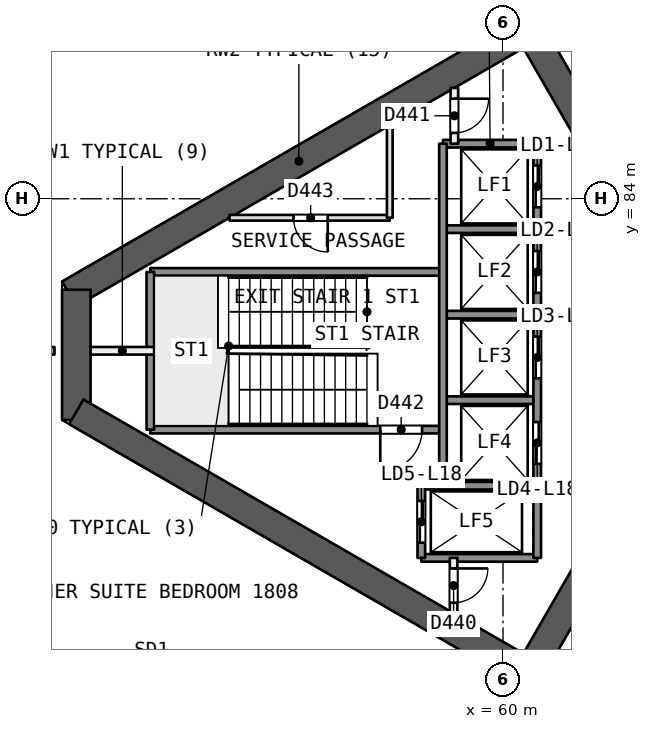
"""IFC4 building model, lengths in metres.
Left out: names, types, materials, properties, quantities, classifications, styles, units other than length and angle.
Written with IfcOpenShell. Run it as: python <this file> out.ifc"""

import sys

from ifc_helpers import new_model, si_unit, direction, frame, frame_2d, origin, place, context, subcontext, project, spatial, rectangle, extrude, element, fill, save


model = new_model("IFC4")
c1 = context("Model", 3, precision=1e-05, world=origin(), true_north=direction((0.0, 1.0)))
c2 = subcontext(c1, "Body", "Model", "MODEL_VIEW")
j1 = project(units=[si_unit("LENGTHUNIT", "METRE"), si_unit("PLANEANGLEUNIT", "RADIAN")], contexts=[c1])
p1 = place(None, origin())
s1 = spatial("IfcSite", under=j1, at=p1, CompositionType="ELEMENT")
p2 = place(p1, origin())
s2 = spatial("IfcBuilding", under=s1, at=p2, CompositionType="ELEMENT")
p3 = place(p2, frame((0.0, 0.0, 79.5)))
s3 = spatial("IfcBuildingStorey", under=s2, at=p3, CompositionType="ELEMENT", Elevation=79.5)
p4 = place(p3, frame((65.567, 80.0, 0.0), z_axis=(0.0, 0.0, 1.0), x_axis=(-0.499988615364, 0.866031976607, 0.0)))
e1 = element("IfcWall", 1, at=p4, inside=s3, PredefinedType="SHEAR", context=c2, shape_type="SweptSolid", body=[
    extrude(rectangle(XDim=10.163, YDim=0.75, at=frame_2d((5.082, 0.0))), origin(), (0.0, 0.0, 1.0), 3.7),
])
p5 = place(p4, frame((0.733, 0.0, 0.0)))
e2 = element("IfcOpeningElement", 2, at=p5, cuts=e1, PredefinedType="OPENING", context=c2, shape_type="SweptSolid", body=[
    extrude(rectangle(XDim=1.2, YDim=2.1, at=frame_2d((0.6, 1.05))), frame((0.0, 0.385, 0.0), z_axis=(0.0, -1.0, 0.0), x_axis=(1.0, 0.0, 0.0)), (0.0, 0.0, 1.0), 0.771),
])
p6 = place(p3, frame((60.673, 88.477, 0.0), z_axis=(0.0, 0.0, 1.0), x_axis=(-0.8660248072, -0.500001033313, 0.0)))
e3 = element("IfcWall", 3, at=p6, inside=s3, PredefinedType="SHEAR", context=c2, shape_type="SweptSolid", body=[
    extrude(rectangle(XDim=13.958, YDim=0.75, at=frame_2d((6.979, 0.0))), origin(), (0.0, 0.0, 1.0), 3.7),
])
p7 = place(p3, frame((48.772, 81.606, 0.0), z_axis=(0.0, 0.0, 1.0), x_axis=(0.0, -1.0, 0.0)))
e4 = element("IfcWall", 4, at=p7, inside=s3, PredefinedType="SHEAR", context=c2, shape_type="SweptSolid", body=[
    extrude(rectangle(XDim=3.429, YDim=0.75, at=frame_2d((1.714, 0.0))), origin(), (0.0, 0.0, 1.0), 3.7),
])
p8 = place(p3, frame((48.772, 78.394, 0.0), z_axis=(0.0, 0.0, 1.0), x_axis=(0.866028339916, -0.499994914436, 0.0)))
e5 = element("IfcWall", 5, at=p8, inside=s3, PredefinedType="SHEAR", context=c2, shape_type="SweptSolid", body=[
    extrude(rectangle(XDim=14.117, YDim=0.75, at=frame_2d((7.059, 0.0))), origin(), (0.0, 0.0, 1.0), 3.7),
])
p9 = place(p3, frame((60.673, 71.523, 0.0), z_axis=(0.0, 0.0, 1.0), x_axis=(0.499997052475, 0.866027105532, 0.0)))
e6 = element("IfcWall", 6, at=p9, inside=s3, PredefinedType="SHEAR", context=c2, shape_type="SweptSolid", body=[
    extrude(rectangle(XDim=10.005, YDim=0.75, at=frame_2d((5.002, 0.0))), origin(), (0.0, 0.0, 1.0), 3.7),
])
p10 = place(p9, frame((7.855, 0.0, 0.0)))
e7 = element("IfcOpeningElement", 7, at=p10, cuts=e6, PredefinedType="OPENING", context=c2, shape_type="SweptSolid", body=[
    extrude(rectangle(XDim=1.2, YDim=2.1, at=frame_2d((0.6, 1.05))), frame((0.0, 0.385, 0.0), z_axis=(0.0, -1.0, 0.0), x_axis=(1.0, 0.0, 0.0)), (0.0, 0.0, 1.0), 0.771),
])
p11 = place(p3, frame((39.372, 80.0, 0.0), z_axis=(0.0, 0.0, 1.0), x_axis=(1.0, 0.0, 0.0)))
e8 = element("IfcWall", 8, at=p11, inside=s3, PredefinedType="PARTITIONING", context=c2, shape_type="SweptSolid", body=[
    extrude(rectangle(XDim=8.826, YDim=0.2, at=frame_2d((4.413, 0.0))), origin(), (0.0, 0.0, 1.0), 3.2),
])
p12 = place(p3, frame((39.223, 83.016, 0.0), z_axis=(0.0, 0.0, 1.0), x_axis=(0.86602468924, 0.500001237625, 0.0)))
e9 = element("IfcWall", 9, at=p12, inside=s3, PredefinedType="SOLIDWALL", context=c2, shape_type="SweptSolid", body=[
    extrude(rectangle(XDim=58.951, YDim=0.3, at=frame_2d((29.476, 0.0))), origin(), (0.0, 0.0, 1.0), 3.2),
])
p13 = place(p12, frame((28.743, 0.0, 0.0)))
e10 = element("IfcOpeningElement", 10, at=p13, cuts=e9, PredefinedType="OPENING", context=c2, shape_type="SweptSolid", body=[
    extrude(rectangle(XDim=2.4, YDim=2.4, at=frame_2d((1.2, 1.2))), frame((0.0, 0.161, 0.0), z_axis=(0.0, -1.0, 0.0), x_axis=(1.0, 0.0, 0.0)), (0.0, 0.0, 1.0), 0.321),
])
p14 = place(p12, frame((34.043, 0.0, 0.0)))
e11 = element("IfcOpeningElement", 11, at=p14, cuts=e9, PredefinedType="OPENING", context=c2, shape_type="SweptSolid", body=[
    extrude(rectangle(XDim=2.4, YDim=2.4, at=frame_2d((1.2, 1.2))), frame((0.0, 0.161, 0.0), z_axis=(0.0, -1.0, 0.0), x_axis=(1.0, 0.0, 0.0)), (0.0, 0.0, 1.0), 0.321),
])
p15 = place(p12, frame((45.739, 0.0, 0.0)))
e12 = element("IfcOpeningElement", 12, at=p15, cuts=e9, PredefinedType="OPENING", context=c2, shape_type="SweptSolid", body=[
    extrude(rectangle(XDim=2.4, YDim=2.4, at=frame_2d((1.2, 1.2))), frame((0.0, 0.161, 0.0), z_axis=(0.0, -1.0, 0.0), x_axis=(1.0, 0.0, 0.0)), (0.0, 0.0, 1.0), 0.321),
])
p16 = place(p12, frame((22.976, 0.0, 0.0)))
e13 = element("IfcOpeningElement", 13, at=p16, cuts=e9, PredefinedType="OPENING", context=c2, shape_type="SweptSolid", body=[
    extrude(rectangle(XDim=2.4, YDim=2.4, at=frame_2d((1.2, 1.2))), frame((0.0, 0.161, 0.0), z_axis=(0.0, -1.0, 0.0), x_axis=(1.0, 0.0, 0.0)), (0.0, 0.0, 1.0), 0.321),
])
p17 = place(p12, frame((10.773, 0.0, 0.0)))
e14 = element("IfcOpeningElement", 14, at=p17, cuts=e9, PredefinedType="OPENING", context=c2, shape_type="SweptSolid", body=[
    extrude(rectangle(XDim=2.4, YDim=2.4, at=frame_2d((1.2, 1.2))), frame((0.0, 0.161, 0.0), z_axis=(0.0, -1.0, 0.0), x_axis=(1.0, 0.0, 0.0)), (0.0, 0.0, 1.0), 0.321),
])
p18 = place(p3, frame((90.276, 47.508, 0.0), z_axis=(0.0, 0.0, 1.0), x_axis=(-0.86602468924, 0.500001237625, 0.0)))
e15 = element("IfcWall", 15, at=p18, inside=s3, PredefinedType="SOLIDWALL", context=c2, shape_type="SweptSolid", body=[
    extrude(rectangle(XDim=58.951, YDim=0.3, at=frame_2d((29.476, 0.0))), origin(), (0.0, 0.0, 1.0), 3.2),
])
p19 = place(p18, frame((32.173, 0.0, 0.0)))
e16 = element("IfcOpeningElement", 16, at=p19, cuts=e15, PredefinedType="OPENING", context=c2, shape_type="SweptSolid", body=[
    extrude(rectangle(XDim=2.4, YDim=2.4, at=frame_2d((1.2, 1.2))), frame((0.0, 0.161, 0.0), z_axis=(0.0, -1.0, 0.0), x_axis=(1.0, 0.0, 0.0)), (0.0, 0.0, 1.0), 0.321),
])
p20 = place(p18, frame((45.739, 0.0, 0.0)))
e17 = element("IfcOpeningElement", 17, at=p20, cuts=e15, PredefinedType="OPENING", context=c2, shape_type="SweptSolid", body=[
    extrude(rectangle(XDim=2.4, YDim=2.4, at=frame_2d((1.2, 1.2))), frame((0.0, 0.161, 0.0), z_axis=(0.0, -1.0, 0.0), x_axis=(1.0, 0.0, 0.0)), (0.0, 0.0, 1.0), 0.321),
])
p21 = place(p18, frame((13.495, 0.0, 0.0)))
e18 = element("IfcOpeningElement", 18, at=p21, cuts=e15, PredefinedType="OPENING", context=c2, shape_type="SweptSolid", body=[
    extrude(rectangle(XDim=2.4, YDim=2.4, at=frame_2d((1.2, 1.2))), frame((0.0, 0.161, 0.0), z_axis=(0.0, -1.0, 0.0), x_axis=(1.0, 0.0, 0.0)), (0.0, 0.0, 1.0), 0.321),
])
p22 = place(p3, frame((60.9, 85.45, 0.0), z_axis=(0.0, 0.0, 1.0), x_axis=(-1.0, 0.0, 0.0)))
e19 = element("IfcWall", 19, at=p22, inside=s3, PredefinedType="SOLIDWALL", context=c2, shape_type="SweptSolid", body=[
    extrude(rectangle(XDim=2.48, YDim=0.2, at=frame_2d((1.24, 0.0))), origin(), (0.0, 0.0, 1.0), 3.2),
])
p23 = place(p3, frame((57.02, 83.5, 0.0), z_axis=(0.0, 0.0, 1.0), x_axis=(-1.0, 0.0, 0.0)))
e20 = element("IfcWall", 20, at=p23, inside=s3, PredefinedType="PARTITIONING", context=c2, shape_type="SweptSolid", body=[
    extrude(rectangle(XDim=4.218, YDim=0.15, at=frame_2d((2.109, 0.0))), origin(), (0.0, 0.0, 1.0), 3.2),
])
p24 = place(p23, frame((1.631, 0.0, 0.0)))
e21 = element("IfcOpeningElement", 21, at=p24, cuts=e20, PredefinedType="OPENING", context=c2, shape_type="SweptSolid", body=[
    extrude(rectangle(XDim=0.9, YDim=2.1, at=frame_2d((0.45, 1.05))), frame((0.0, 0.085, 0.0), z_axis=(0.0, -1.0, 0.0), x_axis=(1.0, 0.0, 0.0)), (0.0, 0.0, 1.0), 0.171),
])
p25 = place(p3, frame((60.9, 83.2, 0.0), z_axis=(0.0, 0.0, 1.0), x_axis=(-1.0, 0.0, 0.0)))
e22 = element("IfcWall", 22, at=p25, inside=s3, PredefinedType="SOLIDWALL", context=c2, shape_type="SweptSolid", body=[
    extrude(rectangle(XDim=2.48, YDim=0.2, at=frame_2d((1.24, 0.0))), origin(), (0.0, 0.0, 1.0), 3.2),
])
p26 = place(p3, frame((58.42, 82.075, 0.0), z_axis=(0.0, 0.0, 1.0), x_axis=(-1.0, 0.0, 0.0)))
e23 = element("IfcWall", 23, at=p26, inside=s3, PredefinedType="SOLIDWALL", context=c2, shape_type="SweptSolid", body=[
    extrude(rectangle(XDim=7.7, YDim=0.2, at=frame_2d((3.85, 0.0))), origin(), (0.0, 0.0, 1.0), 3.2),
])
p27 = place(p3, frame((60.9, 80.95, 0.0), z_axis=(0.0, 0.0, 1.0), x_axis=(-1.0, 0.0, 0.0)))
e24 = element("IfcWall", 24, at=p27, inside=s3, PredefinedType="SOLIDWALL", context=c2, shape_type="SweptSolid", body=[
    extrude(rectangle(XDim=2.48, YDim=0.2, at=frame_2d((1.24, 0.0))), origin(), (0.0, 0.0, 1.0), 3.2),
])
p28 = place(p3, frame((50.82, 80.0, 0.0), z_axis=(0.0, 0.0, 1.0), x_axis=(-1.0, 0.0, 0.0)))
e25 = element("IfcWall", 25, at=p28, inside=s3, PredefinedType="PARTITIONING", context=c2, shape_type="SweptSolid", body=[
    extrude(rectangle(XDim=1.673, YDim=0.2, at=frame_2d((0.836, 0.0))), origin(), (0.0, 0.0, 1.0), 3.2),
])
p29 = place(p3, frame((60.9, 78.7, 0.0), z_axis=(0.0, 0.0, 1.0), x_axis=(-1.0, 0.0, 0.0)))
e26 = element("IfcWall", 26, at=p29, inside=s3, PredefinedType="SOLIDWALL", context=c2, shape_type="SweptSolid", body=[
    extrude(rectangle(XDim=2.48, YDim=0.2, at=frame_2d((1.24, 0.0))), origin(), (0.0, 0.0, 1.0), 3.2),
])
p30 = place(p3, frame((58.42, 77.925, 0.0), z_axis=(0.0, 0.0, 1.0), x_axis=(-1.0, 0.0, 0.0)))
e27 = element("IfcWall", 27, at=p30, inside=s3, PredefinedType="SOLIDWALL", context=c2, shape_type="SweptSolid", body=[
    extrude(rectangle(XDim=7.7, YDim=0.2, at=frame_2d((3.85, 0.0))), origin(), (0.0, 0.0, 1.0), 3.2),
])
p31 = place(p30, frame((0.55, 0.0, 0.0)))
e28 = element("IfcOpeningElement", 28, at=p31, cuts=e27, PredefinedType="OPENING", context=c2, shape_type="SweptSolid", body=[
    extrude(rectangle(XDim=1.1, YDim=2.1, at=frame_2d((0.55, 1.05))), frame((0.0, 0.11, 0.0), z_axis=(0.0, -1.0, 0.0), x_axis=(1.0, 0.0, 0.0)), (0.0, 0.0, 1.0), 0.221),
])
for number, where, z_axis, x_axis in (
    (29, (60.9, 76.45, 0.0), (0.0, 0.0, 1.0), (-1.0, 0.0, 0.0)),
    (30, (60.9, 74.55, 0.0), (0.0, 0.0, 1.0), (-1.0, 0.0, 0.0)),
):
    element("IfcWall", number, at=place(p3, frame(where, z_axis=z_axis, x_axis=x_axis)), inside=s3, PredefinedType="SOLIDWALL", context=c2, shape_type="SweptSolid", body=[
        extrude(rectangle(XDim=3.05, YDim=0.2, at=frame_2d((1.525, 0.0))), origin(), (0.0, 0.0, 1.0), 3.2),
    ])
p32 = place(p3, frame((60.9, 85.45, 0.0), z_axis=(0.0, 0.0, 1.0), x_axis=(0.0, -1.0, 0.0)))
e31 = element("IfcWall", 31, at=p32, inside=s3, PredefinedType="SOLIDWALL", context=c2, shape_type="SweptSolid", body=[
    extrude(rectangle(XDim=10.9, YDim=0.2, at=frame_2d((5.45, 0.0))), origin(), (0.0, 0.0, 1.0), 3.2),
])
p33 = place(p32, frame((0.575, 0.0, 0.0)))
e32 = element("IfcOpeningElement", 32, at=p33, cuts=e31, PredefinedType="OPENING", context=c2, shape_type="SweptSolid", body=[
    extrude(rectangle(XDim=1.1, YDim=2.1, at=frame_2d((0.55, 1.05))), frame((0.0, 0.11, 0.0), z_axis=(0.0, -1.0, 0.0), x_axis=(1.0, 0.0, 0.0)), (0.0, 0.0, 1.0), 0.221),
])
p34 = place(p32, frame((2.825, 0.0, 0.0)))
e33 = element("IfcOpeningElement", 33, at=p34, cuts=e31, PredefinedType="OPENING", context=c2, shape_type="SweptSolid", body=[
    extrude(rectangle(XDim=1.1, YDim=2.1, at=frame_2d((0.55, 1.05))), frame((0.0, 0.11, 0.0), z_axis=(0.0, -1.0, 0.0), x_axis=(1.0, 0.0, 0.0)), (0.0, 0.0, 1.0), 0.221),
])
p35 = place(p32, frame((5.075, 0.0, 0.0)))
e34 = element("IfcOpeningElement", 34, at=p35, cuts=e31, PredefinedType="OPENING", context=c2, shape_type="SweptSolid", body=[
    extrude(rectangle(XDim=1.1, YDim=2.1, at=frame_2d((0.55, 1.05))), frame((0.0, 0.11, 0.0), z_axis=(0.0, -1.0, 0.0), x_axis=(1.0, 0.0, 0.0)), (0.0, 0.0, 1.0), 0.221),
])
p36 = place(p32, frame((7.325, 0.0, 0.0)))
e35 = element("IfcOpeningElement", 35, at=p36, cuts=e31, PredefinedType="OPENING", context=c2, shape_type="SweptSolid", body=[
    extrude(rectangle(XDim=1.1, YDim=2.1, at=frame_2d((0.55, 1.05))), frame((0.0, 0.11, 0.0), z_axis=(0.0, -1.0, 0.0), x_axis=(1.0, 0.0, 0.0)), (0.0, 0.0, 1.0), 0.221),
])
p37 = place(p3, frame((58.72, 86.917, 0.0), z_axis=(0.0, 0.0, 1.0), x_axis=(0.0, -1.0, 0.0)))
e36 = element("IfcWall", 36, at=p37, inside=s3, PredefinedType="PARTITIONING", context=c2, shape_type="SweptSolid", body=[
    extrude(rectangle(XDim=1.467, YDim=0.2, at=frame_2d((0.733, 0.0))), origin(), (0.0, 0.0, 1.0), 3.2),
])
p38 = place(p37, frame((0.283, 0.0, 0.0)))
e37 = element("IfcOpeningElement", 37, at=p38, cuts=e36, PredefinedType="OPENING", context=c2, shape_type="SweptSolid", body=[
    extrude(rectangle(XDim=0.9, YDim=2.1, at=frame_2d((0.45, 1.05))), frame((0.0, 0.11, 0.0), z_axis=(0.0, -1.0, 0.0), x_axis=(1.0, 0.0, 0.0)), (0.0, 0.0, 1.0), 0.221),
])
p39 = place(p3, frame((58.7, 74.55, 0.0), z_axis=(0.0, 0.0, 1.0), x_axis=(0.0, -1.0, 0.0)))
e38 = element("IfcWall", 38, at=p39, inside=s3, PredefinedType="PARTITIONING", context=c2, shape_type="SweptSolid", body=[
    extrude(rectangle(XDim=1.455, YDim=0.2, at=frame_2d((0.728, 0.0))), origin(), (0.0, 0.0, 1.0), 3.2),
])
p40 = place(p39, frame((0.278, 0.0, 0.0)))
e39 = element("IfcOpeningElement", 39, at=p40, cuts=e38, PredefinedType="OPENING", context=c2, shape_type="SweptSolid", body=[
    extrude(rectangle(XDim=0.9, YDim=2.1, at=frame_2d((0.45, 1.05))), frame((0.0, 0.11, 0.0), z_axis=(0.0, -1.0, 0.0), x_axis=(1.0, 0.0, 0.0)), (0.0, 0.0, 1.0), 0.221),
])
p41 = place(p3, frame((58.42, 85.45, 0.0), z_axis=(0.0, 0.0, 1.0), x_axis=(0.0, -1.0, 0.0)))
e40 = element("IfcWall", 40, at=p41, inside=s3, PredefinedType="SOLIDWALL", context=c2, shape_type="SweptSolid", body=[
    extrude(rectangle(XDim=9.0, YDim=0.2, at=frame_2d((4.5, 0.0))), origin(), (0.0, 0.0, 1.0), 3.2),
])
p42 = place(p3, frame((57.85, 76.45, 0.0), z_axis=(0.0, 0.0, 1.0), x_axis=(0.0, -1.0, 0.0)))
e41 = element("IfcWall", 41, at=p42, inside=s3, PredefinedType="SOLIDWALL", context=c2, shape_type="SweptSolid", body=[
    extrude(rectangle(XDim=1.9, YDim=0.2, at=frame_2d((0.95, 0.0))), origin(), (0.0, 0.0, 1.0), 3.2),
])
p43 = place(p42, frame((0.4, 0.0, 0.0)))
e42 = element("IfcOpeningElement", 42, at=p43, cuts=e41, PredefinedType="OPENING", context=c2, shape_type="SweptSolid", body=[
    extrude(rectangle(XDim=1.1, YDim=2.1, at=frame_2d((0.55, 1.05))), frame((0.0, 0.11, 0.0), z_axis=(0.0, -1.0, 0.0), x_axis=(1.0, 0.0, 0.0)), (0.0, 0.0, 1.0), 0.221),
])
p44 = place(p3, frame((57.02, 85.935, 0.0), z_axis=(0.0, 0.0, 1.0), x_axis=(0.0, -1.0, 0.0)))
e43 = element("IfcWall", 43, at=p44, inside=s3, PredefinedType="PARTITIONING", context=c2, shape_type="SweptSolid", body=[
    extrude(rectangle(XDim=2.435, YDim=0.15, at=frame_2d((1.218, 0.0))), origin(), (0.0, 0.0, 1.0), 3.2),
])
p45 = place(p3, frame((50.72, 82.075, 0.0), z_axis=(0.0, 0.0, 1.0), x_axis=(0.0, -1.0, 0.0)))
e44 = element("IfcWall", 44, at=p45, inside=s3, PredefinedType="SOLIDWALL", context=c2, shape_type="SweptSolid", body=[
    extrude(rectangle(XDim=4.15, YDim=0.2, at=frame_2d((2.075, 0.0))), origin(), (0.0, 0.0, 1.0), 3.2),
])
p46 = place(p33, origin())
e45 = element("IfcDoor", 45, at=p46, inside=s3, OperationType="SLIDING_TO_RIGHT", PredefinedType="NOTDEFINED", context=c2, shape_type="SweptSolid", body=[
    extrude(rectangle(XDim=1.1, YDim=2.1, at=frame_2d((0.55, 1.05))), frame((0.0, 0.025, 0.0), z_axis=(0.0, -1.0, 0.0), x_axis=(1.0, 0.0, 0.0)), (0.0, 0.0, 1.0), 0.05),
])
fill(e32, e45)
p47 = place(p34, origin())
e46 = element("IfcDoor", 46, at=p47, inside=s3, OperationType="SLIDING_TO_LEFT", PredefinedType="NOTDEFINED", context=c2, shape_type="SweptSolid", body=[
    extrude(rectangle(XDim=1.1, YDim=2.1, at=frame_2d((0.55, 1.05))), frame((0.0, 0.025, 0.0), z_axis=(0.0, -1.0, 0.0), x_axis=(1.0, 0.0, 0.0)), (0.0, 0.0, 1.0), 0.05),
])
fill(e33, e46)
p48 = place(p35, origin())
e47 = element("IfcDoor", 47, at=p48, inside=s3, OperationType="SLIDING_TO_RIGHT", PredefinedType="NOTDEFINED", context=c2, shape_type="SweptSolid", body=[
    extrude(rectangle(XDim=1.1, YDim=2.1, at=frame_2d((0.55, 1.05))), frame((0.0, 0.025, 0.0), z_axis=(0.0, -1.0, 0.0), x_axis=(1.0, 0.0, 0.0)), (0.0, 0.0, 1.0), 0.05),
])
fill(e34, e47)
p49 = place(p36, origin())
e48 = element("IfcDoor", 48, at=p49, inside=s3, OperationType="SLIDING_TO_LEFT", PredefinedType="NOTDEFINED", context=c2, shape_type="SweptSolid", body=[
    extrude(rectangle(XDim=1.1, YDim=2.1, at=frame_2d((0.55, 1.05))), frame((0.0, 0.025, 0.0), z_axis=(0.0, -1.0, 0.0), x_axis=(1.0, 0.0, 0.0)), (0.0, 0.0, 1.0), 0.05),
])
fill(e35, e48)
p50 = place(p43, origin())
e49 = element("IfcDoor", 49, at=p50, inside=s3, OperationType="SLIDING_TO_RIGHT", PredefinedType="NOTDEFINED", context=c2, shape_type="SweptSolid", body=[
    extrude(rectangle(XDim=1.1, YDim=2.1, at=frame_2d((0.55, 1.05))), frame((0.0, 0.025, 0.0), z_axis=(0.0, -1.0, 0.0), x_axis=(1.0, 0.0, 0.0)), (0.0, 0.0, 1.0), 0.05),
])
fill(e42, e49)
p51 = place(p40, origin())
e50 = element("IfcDoor", 50, at=p51, inside=s3, OperationType="SINGLE_SWING_LEFT", PredefinedType="NOTDEFINED", context=c2, shape_type="SweptSolid", body=[
    extrude(rectangle(XDim=0.9, YDim=2.1, at=frame_2d((0.45, 1.05))), frame((0.0, 0.025, 0.0), z_axis=(0.0, -1.0, 0.0), x_axis=(1.0, 0.0, 0.0)), (0.0, 0.0, 1.0), 0.05),
])
fill(e39, e50)
p52 = place(p38, origin())
e51 = element("IfcDoor", 51, at=p52, inside=s3, OperationType="SINGLE_SWING_LEFT", PredefinedType="NOTDEFINED", context=c2, shape_type="SweptSolid", body=[
    extrude(rectangle(XDim=0.9, YDim=2.1, at=frame_2d((0.45, 1.05))), frame((0.0, 0.025, 0.0), z_axis=(0.0, -1.0, 0.0), x_axis=(1.0, 0.0, 0.0)), (0.0, 0.0, 1.0), 0.05),
])
fill(e37, e51)
p53 = place(p31, origin())
e52 = element("IfcDoor", 52, at=p53, inside=s3, OperationType="SINGLE_SWING_RIGHT", PredefinedType="NOTDEFINED", context=c2, shape_type="SweptSolid", body=[
    extrude(rectangle(XDim=1.1, YDim=2.1, at=frame_2d((0.55, 1.05))), frame((0.0, 0.025, 0.0), z_axis=(0.0, -1.0, 0.0), x_axis=(1.0, 0.0, 0.0)), (0.0, 0.0, 1.0), 0.05),
])
fill(e28, e52)
p54 = place(p24, origin())
e53 = element("IfcDoor", 53, at=p54, inside=s3, OperationType="SINGLE_SWING_LEFT", PredefinedType="NOTDEFINED", context=c2, shape_type="SweptSolid", body=[
    extrude(rectangle(XDim=0.9, YDim=2.1, at=frame_2d((0.45, 1.05))), frame((0.0, 0.025, 0.0), z_axis=(0.0, -1.0, 0.0), x_axis=(1.0, 0.0, 0.0)), (0.0, 0.0, 1.0), 0.05),
])
fill(e21, e53)
save(model, sys.argv[1])
